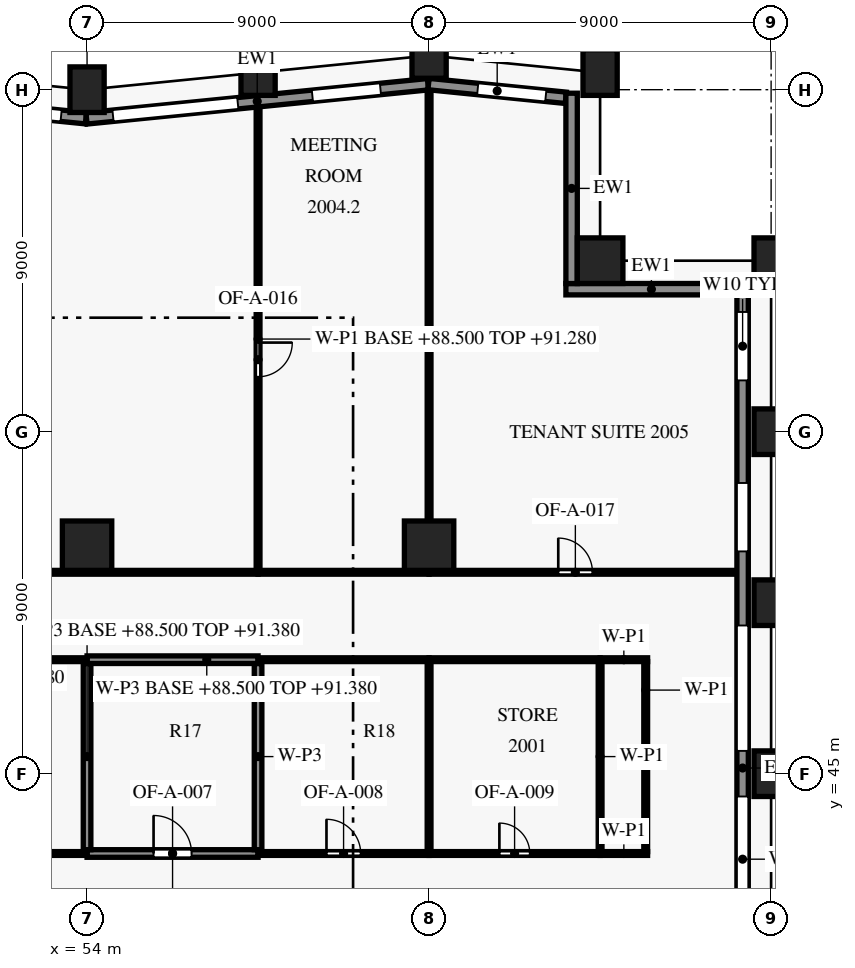
"""IFC4 building model, lengths in metres.
Left out: names, types, materials, properties, quantities, classifications, styles, units other than length and angle.
Written with IfcOpenShell. Run it as: python <this file> out.ifc"""

import sys

from ifc_helpers import new_model, si_unit, direction, frame, frame_2d, origin, origin_2d, place, context, subcontext, project, spatial, rectangle, extrude, element, fill, save


model = new_model("IFC4")
c1 = context("Model", 3, precision=1e-05, world=origin(), true_north=direction((0.0, 1.0)))
c2 = subcontext(c1, "Body", "Model", "MODEL_VIEW")
j1 = project(units=[si_unit("LENGTHUNIT", "METRE"), si_unit("PLANEANGLEUNIT", "RADIAN")], contexts=[c1])
p1 = place(None, origin())
s1 = spatial("IfcSite", under=j1, at=p1, CompositionType="ELEMENT")
p2 = place(p1, origin())
s2 = spatial("IfcBuilding", under=s1, at=p2, CompositionType="ELEMENT")
p3 = place(p2, frame((0.0, 0.0, 88.5)))
s3 = spatial("IfcBuildingStorey", under=s2, at=p3, CompositionType="ELEMENT", Elevation=88.5)
for number, where, z_axis, x_axis in (
    (1, (72.0, 45.0, 0.0), (0.0, 0.0, 1.0), (0.0, 1.0, 0.0)),
    (2, (72.0, 49.5, 0.0), (0.0, 0.0, 1.0), (0.0, 1.0, 0.0)),
    (3, (72.0, 54.0, 0.0), (0.0, 0.0, 1.0), (0.0, 1.0, 0.0)),
    (4, (72.0, 58.5, 0.0), (0.0, 0.0, 1.0), (0.0, 1.0, 0.0)),
    (5, (67.5, 63.45, 0.0), (0.0, 0.0, 1.0), (-0.995, 0.1, 0.0)),
    (6, (63.0, 63.9, 0.0), (0.0, 0.0, 1.0), (-1.0, 0.0, 0.0)),
    (7, (58.5, 63.45, 0.0), (0.0, 0.0, 1.0), (-0.995, -0.1, 0.0)),
    (8, (54.0, 63.0, 0.0), (0.0, 0.0, 1.0), (-1.0, 0.0, 0.0)),
):
    element("IfcColumn", number, at=place(p3, frame(where, z_axis=z_axis, x_axis=x_axis)), inside=s3, PredefinedType="COLUMN", context=c2, shape_type="SweptSolid", body=[
        extrude(rectangle(XDim=0.9, YDim=1.2, at=origin_2d()), origin(), (0.0, 0.0, 1.0), 3.8),
    ])
p4 = place(p3, frame((67.5, 58.5, 0.0), z_axis=(0.0, 0.0, 1.0), x_axis=(1.0, 0.0, 0.0)))
e9 = element("IfcColumn", 9, at=p4, inside=s3, PredefinedType="COLUMN", context=c2, shape_type="SweptSolid", body=[
    extrude(rectangle(XDim=1.2, YDim=1.2, at=origin_2d()), origin(), (0.0, 0.0, 1.0), 3.8),
])
for number, where, z_axis, x_axis in (
    (10, (54.0, 51.0, 0.0), (0.0, 0.0, 1.0), (1.0, 0.0, 0.0)),
    (11, (63.0, 51.0, 0.0), (0.0, 0.0, 1.0), (1.0, 0.0, 0.0)),
):
    element("IfcColumn", number, at=place(p3, frame(where, z_axis=z_axis, x_axis=x_axis)), inside=s3, PredefinedType="COLUMN", context=c2, shape_type="SweptSolid", body=[
        extrude(rectangle(XDim=1.3, YDim=1.3, at=origin_2d()), origin(), (0.0, 0.0, 1.0), 3.8),
    ])
p5 = place(p3, frame((71.25, 57.9, 0.0), z_axis=(0.0, 0.0, 1.0), x_axis=(0.0, -1.0, 0.0)))
e12 = element("IfcWall", 12, at=p5, inside=s3, PredefinedType="SOLIDWALL", context=c2, shape_type="SweptSolid", body=[
    extrude(rectangle(XDim=25.502, YDim=0.3, at=frame_2d((12.751, 0.0))), origin(), (0.0, 0.0, 1.0), 3.15),
])
p6 = place(p5, frame((0.75, 0.0, 0.75)))
e13 = element("IfcOpeningElement", 13, at=p6, cuts=e12, PredefinedType="OPENING", context=c2, shape_type="SweptSolid", body=[
    extrude(rectangle(XDim=1.8, YDim=1.8, at=frame_2d((0.9, 0.9))), frame((0.0, 0.16, 0.0), z_axis=(0.0, -1.0, 0.0), x_axis=(1.0, 0.0, 0.0)), (0.0, 0.0, 1.0), 0.32),
])
p7 = place(p5, frame((5.25, 0.0, 0.75)))
e14 = element("IfcOpeningElement", 14, at=p7, cuts=e12, PredefinedType="OPENING", context=c2, shape_type="SweptSolid", body=[
    extrude(rectangle(XDim=1.8, YDim=1.8, at=frame_2d((0.9, 0.9))), frame((0.0, 0.16, 0.0), z_axis=(0.0, -1.0, 0.0), x_axis=(1.0, 0.0, 0.0)), (0.0, 0.0, 1.0), 0.32),
])
p8 = place(p5, frame((9.0, 0.0, 0.15)))
e15 = element("IfcOpeningElement", 15, at=p8, cuts=e12, PredefinedType="OPENING", context=c2, shape_type="SweptSolid", body=[
    extrude(rectangle(XDim=3.3, YDim=2.4, at=frame_2d((1.65, 1.2))), frame((0.0, 0.16, 0.0), z_axis=(0.0, -1.0, 0.0), x_axis=(1.0, 0.0, 0.0)), (0.0, 0.0, 1.0), 0.32),
])
p9 = place(p5, frame((13.5, 0.0, 0.15)))
e16 = element("IfcOpeningElement", 16, at=p9, cuts=e12, PredefinedType="OPENING", context=c2, shape_type="SweptSolid", body=[
    extrude(rectangle(XDim=3.3, YDim=2.4, at=frame_2d((1.65, 1.2))), frame((0.0, 0.16, 0.0), z_axis=(0.0, -1.0, 0.0), x_axis=(1.0, 0.0, 0.0)), (0.0, 0.0, 1.0), 0.32),
])
p10 = place(p5, frame((18.75, 0.0, 0.75)))
e17 = element("IfcOpeningElement", 17, at=p10, cuts=e12, PredefinedType="OPENING", context=c2, shape_type="SweptSolid", body=[
    extrude(rectangle(XDim=1.8, YDim=1.8, at=frame_2d((0.9, 0.9))), frame((0.0, 0.16, 0.0), z_axis=(0.0, -1.0, 0.0), x_axis=(1.0, 0.0, 0.0)), (0.0, 0.0, 1.0), 0.32),
])
p11 = place(p5, frame((23.25, 0.0, 0.75)))
e18 = element("IfcOpeningElement", 18, at=p11, cuts=e12, PredefinedType="OPENING", context=c2, shape_type="SweptSolid", body=[
    extrude(rectangle(XDim=1.8, YDim=1.8, at=frame_2d((0.9, 0.9))), frame((0.0, 0.16, 0.0), z_axis=(0.0, -1.0, 0.0), x_axis=(1.0, 0.0, 0.0)), (0.0, 0.0, 1.0), 0.32),
])
p12 = place(p3, frame((66.6, 57.75, 0.0), z_axis=(0.0, 0.0, 1.0), x_axis=(1.0, 0.0, 0.0)))
e19 = element("IfcWall", 19, at=p12, inside=s3, PredefinedType="SOLIDWALL", context=c2, shape_type="SweptSolid", body=[
    extrude(rectangle(XDim=4.5, YDim=0.3, at=frame_2d((2.25, 0.0))), origin(), (0.0, 0.0, 1.0), 3.15),
])
p13 = place(p3, frame((66.75, 62.907, 0.0), z_axis=(0.0, 0.0, 1.0), x_axis=(0.0, -1.0, 0.0)))
e20 = element("IfcWall", 20, at=p13, inside=s3, PredefinedType="SOLIDWALL", context=c2, shape_type="SweptSolid", body=[
    extrude(rectangle(XDim=5.009, YDim=0.3, at=frame_2d((2.504, 0.0))), origin(), (0.0, 0.0, 1.0), 3.15),
])
p14 = place(p3, frame((62.985, 63.148, 0.0), z_axis=(0.0, 0.0, 1.0), x_axis=(0.995038521274, -0.099490407478, 0.0)))
e21 = element("IfcWall", 21, at=p14, inside=s3, PredefinedType="SOLIDWALL", context=c2, shape_type="SweptSolid", body=[
    extrude(rectangle(XDim=3.632, YDim=0.3, at=frame_2d((1.816, 0.0))), origin(), (0.0, 0.0, 1.0), 3.15),
])
p15 = place(p14, frame((1.301, 0.0, 0.75)))
e22 = element("IfcOpeningElement", 22, at=p15, cuts=e21, PredefinedType="OPENING", context=c2, shape_type="SweptSolid", body=[
    extrude(rectangle(XDim=1.8, YDim=1.8, at=frame_2d((0.9, 0.9))), frame((0.0, 0.16, 0.0), z_axis=(0.0, -1.0, 0.0), x_axis=(1.0, 0.0, 0.0)), (0.0, 0.0, 1.0), 0.32),
])
p16 = place(p3, frame((53.985, 62.245, 0.0), z_axis=(0.0, 0.0, 1.0), x_axis=(0.995037993253, 0.099495688264, 0.0)))
e23 = element("IfcWall", 23, at=p16, inside=s3, PredefinedType="SOLIDWALL", context=c2, shape_type="SweptSolid", body=[
    extrude(rectangle(XDim=9.03, YDim=0.3, at=frame_2d((4.515, 0.0))), origin(), (0.0, 0.0, 1.0), 3.15),
])
p17 = place(p16, frame((0.701, 0.0, 0.15)))
e24 = element("IfcOpeningElement", 24, at=p17, cuts=e23, PredefinedType="OPENING", context=c2, shape_type="SweptSolid", body=[
    extrude(rectangle(XDim=3.3, YDim=2.4, at=frame_2d((1.65, 1.2))), frame((0.0, 0.16, 0.0), z_axis=(0.0, -1.0, 0.0), x_axis=(1.0, 0.0, 0.0)), (0.0, 0.0, 1.0), 0.32),
])
p18 = place(p16, frame((5.974, 0.0, 0.75)))
e25 = element("IfcOpeningElement", 25, at=p18, cuts=e23, PredefinedType="OPENING", context=c2, shape_type="SweptSolid", body=[
    extrude(rectangle(XDim=1.8, YDim=1.8, at=frame_2d((0.9, 0.9))), frame((0.0, 0.16, 0.0), z_axis=(0.0, -1.0, 0.0), x_axis=(1.0, 0.0, 0.0)), (0.0, 0.0, 1.0), 0.32),
])
p19 = place(p3, frame((44.985, 63.148, 0.0), z_axis=(0.0, 0.0, 1.0), x_axis=(0.995037993253, -0.099495688264, 0.0)))
e26 = element("IfcWall", 26, at=p19, inside=s3, PredefinedType="SOLIDWALL", context=c2, shape_type="SweptSolid", body=[
    extrude(rectangle(XDim=9.03, YDim=0.3, at=frame_2d((4.515, 0.0))), origin(), (0.0, 0.0, 1.0), 3.15),
])
p20 = place(p19, frame((1.301, 0.0, 0.75)))
e27 = element("IfcOpeningElement", 27, at=p20, cuts=e26, PredefinedType="OPENING", context=c2, shape_type="SweptSolid", body=[
    extrude(rectangle(XDim=1.8, YDim=1.8, at=frame_2d((0.9, 0.9))), frame((0.0, 0.16, 0.0), z_axis=(0.0, -1.0, 0.0), x_axis=(1.0, 0.0, 0.0)), (0.0, 0.0, 1.0), 0.32),
])
p21 = place(p19, frame((5.073, 0.0, 0.15)))
e28 = element("IfcOpeningElement", 28, at=p21, cuts=e26, PredefinedType="OPENING", context=c2, shape_type="SweptSolid", body=[
    extrude(rectangle(XDim=3.3, YDim=2.4, at=frame_2d((1.65, 1.2))), frame((0.0, 0.16, 0.0), z_axis=(0.0, -1.0, 0.0), x_axis=(1.0, 0.0, 0.0)), (0.0, 0.0, 1.0), 0.32),
])
p22 = place(p3, frame((51.3, 42.9, 0.0), z_axis=(0.0, 0.0, 1.0), x_axis=(1.0, 0.0, 0.0)))
e29 = element("IfcWall", 29, at=p22, inside=s3, PredefinedType="PARTITIONING", context=c2, shape_type="SweptSolid", body=[
    extrude(rectangle(XDim=2.7, YDim=0.1, at=frame_2d((1.35, 0.0))), origin(), (0.0, 0.0, 1.0), 2.78),
])
p23 = place(p3, frame((54.0, 42.9, 0.0), z_axis=(0.0, 0.0, 1.0), x_axis=(1.0, 0.0, 0.0)))
e30 = element("IfcWall", 30, at=p23, inside=s3, PredefinedType="PARTITIONING", context=c2, shape_type="SweptSolid", body=[
    extrude(rectangle(XDim=4.5, YDim=0.2, at=frame_2d((2.25, 0.0))), origin(), (0.0, 0.0, 1.0), 2.88),
])
p24 = place(p23, frame((1.75, 0.0, 0.0)))
e31 = element("IfcOpeningElement", 31, at=p24, cuts=e30, PredefinedType="OPENING", context=c2, shape_type="SweptSolid", body=[
    extrude(rectangle(XDim=1.0, YDim=2.1, at=frame_2d((0.5, 1.05))), frame((0.0, 0.11, 0.0), z_axis=(0.0, -1.0, 0.0), x_axis=(1.0, 0.0, 0.0)), (0.0, 0.0, 1.0), 0.22),
])
p25 = place(p3, frame((58.5, 42.9, 0.0), z_axis=(0.0, 0.0, 1.0), x_axis=(1.0, 0.0, 0.0)))
e32 = element("IfcWall", 32, at=p25, inside=s3, PredefinedType="PARTITIONING", context=c2, shape_type="SweptSolid", body=[
    extrude(rectangle(XDim=4.5, YDim=0.1, at=frame_2d((2.25, 0.0))), origin(), (0.0, 0.0, 1.0), 2.88),
])
p26 = place(p25, frame((1.8, 0.0, 0.0)))
e33 = element("IfcOpeningElement", 33, at=p26, cuts=e32, PredefinedType="OPENING", context=c2, shape_type="SweptSolid", body=[
    extrude(rectangle(XDim=0.9, YDim=2.1, at=frame_2d((0.45, 1.05))), frame((0.0, 0.06, 0.0), z_axis=(0.0, -1.0, 0.0), x_axis=(1.0, 0.0, 0.0)), (0.0, 0.0, 1.0), 0.12),
])
p27 = place(p3, frame((63.0, 42.9, 0.0), z_axis=(0.0, 0.0, 1.0), x_axis=(1.0, 0.0, 0.0)))
e34 = element("IfcWall", 34, at=p27, inside=s3, PredefinedType="PARTITIONING", context=c2, shape_type="SweptSolid", body=[
    extrude(rectangle(XDim=4.5, YDim=0.1, at=frame_2d((2.25, 0.0))), origin(), (0.0, 0.0, 1.0), 2.88),
])
p28 = place(p27, frame((1.85, 0.0, 0.0)))
e35 = element("IfcOpeningElement", 35, at=p28, cuts=e34, PredefinedType="OPENING", context=c2, shape_type="SweptSolid", body=[
    extrude(rectangle(XDim=0.8, YDim=2.1, at=frame_2d((0.4, 1.05))), frame((0.0, 0.06, 0.0), z_axis=(0.0, -1.0, 0.0), x_axis=(1.0, 0.0, 0.0)), (0.0, 0.0, 1.0), 0.12),
])
p29 = place(p3, frame((67.5, 42.9, 0.0), z_axis=(0.0, 0.0, 1.0), x_axis=(1.0, 0.0, 0.0)))
e36 = element("IfcWall", 36, at=p29, inside=s3, PredefinedType="PARTITIONING", context=c2, shape_type="SweptSolid", body=[
    extrude(rectangle(XDim=1.25, YDim=0.1, at=frame_2d((0.625, 0.0))), origin(), (0.0, 0.0, 1.0), 3.48),
])
p30 = place(p3, frame((68.7, 42.95, 0.0), z_axis=(0.0, 0.0, 1.0), x_axis=(0.0, 1.0, 0.0)))
e37 = element("IfcWall", 37, at=p30, inside=s3, PredefinedType="PARTITIONING", context=c2, shape_type="SweptSolid", body=[
    extrude(rectangle(XDim=5.0, YDim=0.1, at=frame_2d((2.5, 0.0))), origin(), (0.0, 0.0, 1.0), 3.48),
])
p31 = place(p3, frame((54.0, 43.0, 0.0), z_axis=(0.0, 0.0, 1.0), x_axis=(0.0, 1.0, 0.0)))
e38 = element("IfcWall", 38, at=p31, inside=s3, PredefinedType="PARTITIONING", context=c2, shape_type="SweptSolid", body=[
    extrude(rectangle(XDim=4.9, YDim=0.2, at=frame_2d((2.45, 0.0))), origin(), (0.0, 0.0, 1.0), 2.88),
])
p32 = place(p3, frame((58.5, 47.9, 0.0), z_axis=(0.0, 0.0, 1.0), x_axis=(0.0, -1.0, 0.0)))
e39 = element("IfcWall", 39, at=p32, inside=s3, PredefinedType="PARTITIONING", context=c2, shape_type="SweptSolid", body=[
    extrude(rectangle(XDim=4.9, YDim=0.2, at=frame_2d((2.45, 0.0))), origin(), (0.0, 0.0, 1.0), 3.48),
])
p33 = place(p3, frame((63.0, 47.95, 0.0), z_axis=(0.0, 0.0, 1.0), x_axis=(0.0, -1.0, 0.0)))
e40 = element("IfcWall", 40, at=p33, inside=s3, PredefinedType="PARTITIONING", context=c2, shape_type="SweptSolid", body=[
    extrude(rectangle(XDim=5.0, YDim=0.1, at=frame_2d((2.5, 0.0))), origin(), (0.0, 0.0, 1.0), 2.88),
])
p34 = place(p3, frame((67.5, 47.95, 0.0), z_axis=(0.0, 0.0, 1.0), x_axis=(0.0, -1.0, 0.0)))
e41 = element("IfcWall", 41, at=p34, inside=s3, PredefinedType="PARTITIONING", context=c2, shape_type="SweptSolid", body=[
    extrude(rectangle(XDim=5.0, YDim=0.1, at=frame_2d((2.5, 0.0))), origin(), (0.0, 0.0, 1.0), 3.48),
])
p35 = place(p3, frame((54.0, 48.0, 0.0), z_axis=(0.0, 0.0, 1.0), x_axis=(-1.0, 0.0, 0.0)))
e42 = element("IfcWall", 42, at=p35, inside=s3, PredefinedType="PARTITIONING", context=c2, shape_type="SweptSolid", body=[
    extrude(rectangle(XDim=9.0, YDim=0.1, at=frame_2d((4.5, 0.0))), origin(), (0.0, 0.0, 1.0), 2.88),
])
p36 = place(p3, frame((58.5, 48.0, 0.0), z_axis=(0.0, 0.0, 1.0), x_axis=(-1.0, 0.0, 0.0)))
e43 = element("IfcWall", 43, at=p36, inside=s3, PredefinedType="PARTITIONING", context=c2, shape_type="SweptSolid", body=[
    extrude(rectangle(XDim=4.5, YDim=0.2, at=frame_2d((2.25, 0.0))), origin(), (0.0, 0.0, 1.0), 2.88),
])
for number, where, z_axis, x_axis in (
    (44, (63.0, 48.0, 0.0), (0.0, 0.0, 1.0), (-1.0, 0.0, 0.0)),
    (45, (67.5, 48.0, 0.0), (0.0, 0.0, 1.0), (-1.0, 0.0, 0.0)),
):
    element("IfcWall", number, at=place(p3, frame(where, z_axis=z_axis, x_axis=x_axis)), inside=s3, PredefinedType="PARTITIONING", context=c2, shape_type="SweptSolid", body=[
        extrude(rectangle(XDim=4.5, YDim=0.1, at=frame_2d((2.25, 0.0))), origin(), (0.0, 0.0, 1.0), 2.88),
    ])
p37 = place(p3, frame((68.75, 48.0, 0.0), z_axis=(0.0, 0.0, 1.0), x_axis=(-1.0, 0.0, 0.0)))
e46 = element("IfcWall", 46, at=p37, inside=s3, PredefinedType="PARTITIONING", context=c2, shape_type="SweptSolid", body=[
    extrude(rectangle(XDim=1.25, YDim=0.1, at=frame_2d((0.625, 0.0))), origin(), (0.0, 0.0, 1.0), 3.48),
])
p38 = place(p3, frame((45.0, 50.3, 0.0), z_axis=(0.0, 0.0, 1.0), x_axis=(1.0, 0.0, 0.0)))
e47 = element("IfcWall", 47, at=p38, inside=s3, PredefinedType="PARTITIONING", context=c2, shape_type="SweptSolid", body=[
    extrude(rectangle(XDim=13.5, YDim=0.1, at=frame_2d((6.75, 0.0))), origin(), (0.0, 0.0, 1.0), 2.88),
])
p39 = place(p38, frame((4.05, 0.0, 0.0)))
e48 = element("IfcOpeningElement", 48, at=p39, cuts=e47, PredefinedType="OPENING", context=c2, shape_type="SweptSolid", body=[
    extrude(rectangle(XDim=0.9, YDim=2.1, at=frame_2d((0.45, 1.05))), frame((0.0, 0.06, 0.0), z_axis=(0.0, -1.0, 0.0), x_axis=(1.0, 0.0, 0.0)), (0.0, 0.0, 1.0), 0.12),
])
p40 = place(p3, frame((58.5, 50.3, 0.0), z_axis=(0.0, 0.0, 1.0), x_axis=(1.0, 0.0, 0.0)))
e49 = element("IfcWall", 49, at=p40, inside=s3, PredefinedType="PARTITIONING", context=c2, shape_type="SweptSolid", body=[
    extrude(rectangle(XDim=4.5, YDim=0.1, at=frame_2d((2.25, 0.0))), origin(), (0.0, 0.0, 1.0), 2.88),
])
p41 = place(p3, frame((63.0, 50.3, 0.0), z_axis=(0.0, 0.0, 1.0), x_axis=(1.0, 0.0, 0.0)))
e50 = element("IfcWall", 50, at=p41, inside=s3, PredefinedType="PARTITIONING", context=c2, shape_type="SweptSolid", body=[
    extrude(rectangle(XDim=8.08, YDim=0.1, at=frame_2d((4.04, 0.0))), origin(), (0.0, 0.0, 1.0), 2.88),
])
p42 = place(p41, frame((3.399, 0.0, 0.0)))
e51 = element("IfcOpeningElement", 51, at=p42, cuts=e50, PredefinedType="OPENING", context=c2, shape_type="SweptSolid", body=[
    extrude(rectangle(XDim=0.9, YDim=2.1, at=frame_2d((0.45, 1.05))), frame((0.0, 0.06, 0.0), z_axis=(0.0, -1.0, 0.0), x_axis=(1.0, 0.0, 0.0)), (0.0, 0.0, 1.0), 0.12),
])
p43 = place(p3, frame((58.5, 62.525, 0.0), z_axis=(0.0, 0.0, 1.0), x_axis=(0.0, -1.0, 0.0)))
e52 = element("IfcWall", 52, at=p43, inside=s3, PredefinedType="PARTITIONING", context=c2, shape_type="SweptSolid", body=[
    extrude(rectangle(XDim=12.175, YDim=0.1, at=frame_2d((6.088, 0.0))), origin(), (0.0, 0.0, 1.0), 2.78),
])
p44 = place(p43, frame((6.18, 0.0, 0.0)))
e53 = element("IfcOpeningElement", 53, at=p44, cuts=e52, PredefinedType="OPENING", context=c2, shape_type="SweptSolid", body=[
    extrude(rectangle(XDim=0.9, YDim=2.1, at=frame_2d((0.45, 1.05))), frame((0.0, 0.06, 0.0), z_axis=(0.0, -1.0, 0.0), x_axis=(1.0, 0.0, 0.0)), (0.0, 0.0, 1.0), 0.12),
])
p45 = place(p3, frame((63.0, 62.976, 0.0), z_axis=(0.0, 0.0, 1.0), x_axis=(0.0, -1.0, 0.0)))
e54 = element("IfcWall", 54, at=p45, inside=s3, PredefinedType="PARTITIONING", context=c2, shape_type="SweptSolid", body=[
    extrude(rectangle(XDim=11.321, YDim=0.1, at=frame_2d((5.66, 0.0))), origin(), (0.0, 0.0, 1.0), 2.88),
])
p46 = place(p6, origin())
e55 = element("IfcWindow", 55, at=p46, inside=s3, PartitioningType="SINGLE_PANEL", PredefinedType="WINDOW", context=c2, shape_type="SweptSolid", body=[
    extrude(rectangle(XDim=1.8, YDim=1.8, at=frame_2d((0.9, 0.9))), frame((0.0, 0.03, 0.0), z_axis=(0.0, -1.0, 0.0), x_axis=(1.0, 0.0, 0.0)), (0.0, 0.0, 1.0), 0.06),
])
fill(e13, e55)
p47 = place(p7, origin())
e56 = element("IfcWindow", 56, at=p47, inside=s3, PartitioningType="SINGLE_PANEL", PredefinedType="WINDOW", context=c2, shape_type="SweptSolid", body=[
    extrude(rectangle(XDim=1.8, YDim=1.8, at=frame_2d((0.9, 0.9))), frame((0.0, 0.03, 0.0), z_axis=(0.0, -1.0, 0.0), x_axis=(1.0, 0.0, 0.0)), (0.0, 0.0, 1.0), 0.06),
])
fill(e14, e56)
p48 = place(p8, origin())
e57 = element("IfcWindow", 57, at=p48, inside=s3, PartitioningType="SINGLE_PANEL", PredefinedType="WINDOW", context=c2, shape_type="SweptSolid", body=[
    extrude(rectangle(XDim=3.3, YDim=2.4, at=frame_2d((1.65, 1.2))), frame((0.0, 0.03, 0.0), z_axis=(0.0, -1.0, 0.0), x_axis=(1.0, 0.0, 0.0)), (0.0, 0.0, 1.0), 0.06),
])
fill(e15, e57)
p49 = place(p9, origin())
e58 = element("IfcWindow", 58, at=p49, inside=s3, PartitioningType="SINGLE_PANEL", PredefinedType="WINDOW", context=c2, shape_type="SweptSolid", body=[
    extrude(rectangle(XDim=3.3, YDim=2.4, at=frame_2d((1.65, 1.2))), frame((0.0, 0.03, 0.0), z_axis=(0.0, -1.0, 0.0), x_axis=(1.0, 0.0, 0.0)), (0.0, 0.0, 1.0), 0.06),
])
fill(e16, e58)
p50 = place(p15, origin())
e59 = element("IfcWindow", 59, at=p50, inside=s3, PartitioningType="SINGLE_PANEL", PredefinedType="WINDOW", context=c2, shape_type="SweptSolid", body=[
    extrude(rectangle(XDim=1.8, YDim=1.8, at=frame_2d((0.9, 0.9))), frame((0.0, 0.03, 0.0), z_axis=(0.0, -1.0, 0.0), x_axis=(1.0, 0.0, 0.0)), (0.0, 0.0, 1.0), 0.06),
])
fill(e22, e59)
p51 = place(p17, origin())
e60 = element("IfcWindow", 60, at=p51, inside=s3, PartitioningType="SINGLE_PANEL", PredefinedType="WINDOW", context=c2, shape_type="SweptSolid", body=[
    extrude(rectangle(XDim=3.3, YDim=2.4, at=frame_2d((1.65, 1.2))), frame((0.0, 0.03, 0.0), z_axis=(0.0, -1.0, 0.0), x_axis=(1.0, 0.0, 0.0)), (0.0, 0.0, 1.0), 0.06),
])
fill(e24, e60)
p52 = place(p18, origin())
e61 = element("IfcWindow", 61, at=p52, inside=s3, PartitioningType="SINGLE_PANEL", PredefinedType="WINDOW", context=c2, shape_type="SweptSolid", body=[
    extrude(rectangle(XDim=1.8, YDim=1.8, at=frame_2d((0.9, 0.9))), frame((0.0, 0.03, 0.0), z_axis=(0.0, -1.0, 0.0), x_axis=(1.0, 0.0, 0.0)), (0.0, 0.0, 1.0), 0.06),
])
fill(e25, e61)
p53 = place(p21, origin())
e62 = element("IfcWindow", 62, at=p53, inside=s3, PartitioningType="SINGLE_PANEL", PredefinedType="WINDOW", context=c2, shape_type="SweptSolid", body=[
    extrude(rectangle(XDim=3.3, YDim=2.4, at=frame_2d((1.65, 1.2))), frame((0.0, 0.03, 0.0), z_axis=(0.0, -1.0, 0.0), x_axis=(1.0, 0.0, 0.0)), (0.0, 0.0, 1.0), 0.06),
])
fill(e28, e62)
p54 = place(p24, origin())
e63 = element("IfcDoor", 63, at=p54, inside=s3, OperationType="SINGLE_SWING_RIGHT", PredefinedType="DOOR", context=c2, shape_type="SweptSolid", body=[
    extrude(rectangle(XDim=1.0, YDim=2.1, at=frame_2d((0.5, 1.05))), frame((0.0, 0.025, 0.0), z_axis=(0.0, -1.0, 0.0), x_axis=(1.0, 0.0, 0.0)), (0.0, 0.0, 1.0), 0.05),
])
fill(e31, e63)
p55 = place(p26, origin())
e64 = element("IfcDoor", 64, at=p55, inside=s3, OperationType="SINGLE_SWING_LEFT", PredefinedType="DOOR", context=c2, shape_type="SweptSolid", body=[
    extrude(rectangle(XDim=0.9, YDim=2.1, at=frame_2d((0.45, 1.05))), frame((0.0, 0.025, 0.0), z_axis=(0.0, -1.0, 0.0), x_axis=(1.0, 0.0, 0.0)), (0.0, 0.0, 1.0), 0.05),
])
fill(e33, e64)
p56 = place(p28, origin())
e65 = element("IfcDoor", 65, at=p56, inside=s3, OperationType="SINGLE_SWING_RIGHT", PredefinedType="DOOR", context=c2, shape_type="SweptSolid", body=[
    extrude(rectangle(XDim=0.8, YDim=2.1, at=frame_2d((0.4, 1.05))), frame((0.0, 0.025, 0.0), z_axis=(0.0, -1.0, 0.0), x_axis=(1.0, 0.0, 0.0)), (0.0, 0.0, 1.0), 0.05),
])
fill(e35, e65)
p57 = place(p44, origin())
e66 = element("IfcDoor", 66, at=p57, inside=s3, OperationType="SINGLE_SWING_LEFT", PredefinedType="DOOR", context=c2, shape_type="SweptSolid", body=[
    extrude(rectangle(XDim=0.9, YDim=2.1, at=frame_2d((0.45, 1.05))), frame((0.0, 0.025, 0.0), z_axis=(0.0, -1.0, 0.0), x_axis=(1.0, 0.0, 0.0)), (0.0, 0.0, 1.0), 0.05),
])
fill(e53, e66)
p58 = place(p42, origin())
e67 = element("IfcDoor", 67, at=p58, inside=s3, OperationType="SINGLE_SWING_LEFT", PredefinedType="DOOR", context=c2, shape_type="SweptSolid", body=[
    extrude(rectangle(XDim=0.9, YDim=2.1, at=frame_2d((0.45, 1.05))), frame((0.0, 0.025, 0.0), z_axis=(0.0, -1.0, 0.0), x_axis=(1.0, 0.0, 0.0)), (0.0, 0.0, 1.0), 0.05),
])
fill(e51, e67)
save(model, sys.argv[1])
